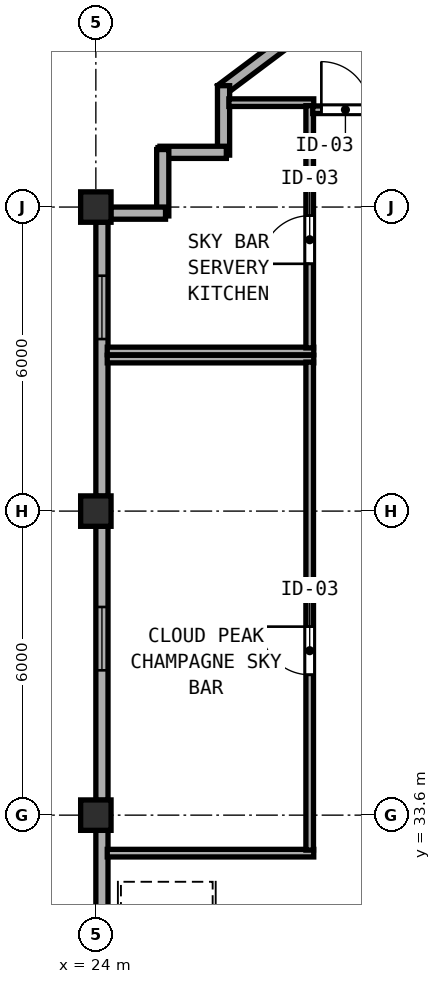
"""IFC4 building model, lengths in metres.
Left out: names, types, materials, properties, quantities, classifications, styles, units other than length and angle.
Written with IfcOpenShell. Run it as: python <this file> out.ifc"""

import sys

from ifc_helpers import new_model, si_unit, direction, frame, frame_2d, origin, origin_2d, place, context, subcontext, project, spatial, rectangle, hollow_rectangle, extrude, element, fill, save


model = new_model("IFC4")
c1 = context("Model", 3, precision=1e-05, world=origin(), true_north=direction((0.0, 1.0)))
c2 = subcontext(c1, "Body", "Model", "MODEL_VIEW")
j1 = project(units=[si_unit("LENGTHUNIT", "METRE"), si_unit("PLANEANGLEUNIT", "RADIAN")], contexts=[c1])
p1 = place(None, origin())
s1 = spatial("IfcSite", under=j1, at=p1, CompositionType="ELEMENT")
p2 = place(p1, origin())
s2 = spatial("IfcBuilding", under=s1, at=p2, CompositionType="ELEMENT")
p3 = place(p2, frame((0.0, 0.0, 323.2)))
s3 = spatial("IfcBuildingStorey", under=s2, at=p3, CompositionType="ELEMENT", Elevation=323.2)
for number, where, z_axis, x_axis in (
    (1, (24.0, 33.6, 0.0), (0.0, 0.0, 1.0), (1.0, 0.0, 0.0)),
    (2, (24.0, 45.6, 0.0), (0.0, 0.0, 1.0), (1.0, 0.0, 0.0)),
    (3, (24.0, 39.6, 0.0), (0.0, 0.0, 1.0), (1.0, 0.0, 0.0)),
):
    element("IfcColumn", number, at=place(p3, frame(where, z_axis=z_axis, x_axis=x_axis)), inside=s3, PredefinedType="COLUMN", context=c2, shape_type="SweptSolid", body=[
        extrude(hollow_rectangle(XDim=0.6, YDim=0.6, WallThickness=0.024, at=origin_2d()), origin(), (0.0, 0.0, 1.0), 5.0),
    ])
p4 = place(p3, frame((31.292, 51.519, 0.0), z_axis=(0.0, 0.0, 1.0), x_axis=(-0.8, -0.6, 0.0)))
e4 = element("IfcWall", 4, at=p4, inside=s3, PredefinedType="SOLIDWALL", context=c2, shape_type="SweptSolid", body=[
    extrude(rectangle(XDim=6.021, YDim=0.24, at=frame_2d((3.01, 0.0))), origin(), (0.0, 0.0, 1.0), 4.75),
])
p5 = place(p4, frame((1.6, 0.0, 0.85)))
e5 = element("IfcOpeningElement", 5, at=p5, cuts=e4, PredefinedType="OPENING", context=c2, shape_type="SweptSolid", body=[
    extrude(rectangle(XDim=1.25, YDim=1.95, at=frame_2d((0.625, 0.975))), frame((0.0, 0.13, 0.0), z_axis=(0.0, -1.0, 0.0), x_axis=(1.0, 0.0, 0.0)), (0.0, 0.0, 1.0), 0.26),
])
p6 = place(p3, frame((26.52, 47.995, 0.0), z_axis=(0.0, 0.0, 1.0), x_axis=(0.0, -1.0, 0.0)))
e6 = element("IfcWall", 6, at=p6, inside=s3, PredefinedType="SOLIDWALL", context=c2, shape_type="SweptSolid", body=[
    extrude(rectangle(XDim=1.37, YDim=0.24, at=frame_2d((0.685, 0.0))), origin(), (0.0, 0.0, 1.0), 4.75),
])
for number, where, z_axis, x_axis in (
    (7, (26.575, 46.68, 0.0), (0.0, 0.0, 1.0), (-1.0, 0.0, 0.0)),
    (8, (25.32, 46.735, 0.0), (0.0, 0.0, 1.0), (0.0, -1.0, 0.0)),
):
    element("IfcWall", number, at=place(p3, frame(where, z_axis=z_axis, x_axis=x_axis)), inside=s3, PredefinedType="SOLIDWALL", context=c2, shape_type="SweptSolid", body=[
        extrude(rectangle(XDim=1.31, YDim=0.24, at=frame_2d((0.655, 0.0))), origin(), (0.0, 0.0, 1.0), 4.75),
    ])
p7 = place(p3, frame((25.375, 45.48, 0.0), z_axis=(0.0, 0.0, 1.0), x_axis=(-1.0, 0.0, 0.0)))
e9 = element("IfcWall", 9, at=p7, inside=s3, PredefinedType="SOLIDWALL", context=c2, shape_type="SweptSolid", body=[
    extrude(rectangle(XDim=1.083, YDim=0.24, at=frame_2d((0.542, 0.0))), origin(), (0.0, 0.0, 1.0), 4.75),
])
p8 = place(p3, frame((24.12, 45.308, 0.0), z_axis=(0.0, 0.0, 1.0), x_axis=(0.0, -1.0, 0.0)))
e10 = element("IfcWall", 10, at=p8, inside=s3, PredefinedType="SOLIDWALL", context=c2, shape_type="SweptSolid", body=[
    extrude(rectangle(XDim=5.416, YDim=0.24, at=frame_2d((2.708, 0.0))), origin(), (0.0, 0.0, 1.0), 4.75),
])
p9 = place(p8, frame((1.063, 0.0, 0.85)))
e11 = element("IfcOpeningElement", 11, at=p9, cuts=e10, PredefinedType="OPENING", context=c2, shape_type="SweptSolid", body=[
    extrude(rectangle(XDim=1.25, YDim=1.95, at=frame_2d((0.625, 0.975))), frame((0.0, 0.13, 0.0), z_axis=(0.0, -1.0, 0.0), x_axis=(1.0, 0.0, 0.0)), (0.0, 0.0, 1.0), 0.26),
])
p10 = place(p3, frame((24.12, 39.308, 0.0), z_axis=(0.0, 0.0, 1.0), x_axis=(0.0, -1.0, 0.0)))
e12 = element("IfcWall", 12, at=p10, inside=s3, PredefinedType="SOLIDWALL", context=c2, shape_type="SweptSolid", body=[
    extrude(rectangle(XDim=5.416, YDim=0.24, at=frame_2d((2.708, 0.0))), origin(), (0.0, 0.0, 1.0), 4.75),
])
p11 = place(p10, frame((1.6, 0.0, 0.85)))
e13 = element("IfcOpeningElement", 13, at=p11, cuts=e12, PredefinedType="OPENING", context=c2, shape_type="SweptSolid", body=[
    extrude(rectangle(XDim=1.25, YDim=1.95, at=frame_2d((0.625, 0.975))), frame((0.0, 0.13, 0.0), z_axis=(0.0, -1.0, 0.0), x_axis=(1.0, 0.0, 0.0)), (0.0, 0.0, 1.0), 0.26),
])
p12 = place(p3, frame((24.12, 33.308, 0.0), z_axis=(0.0, 0.0, 1.0), x_axis=(0.0, -1.0, 0.0)))
e14 = element("IfcWall", 14, at=p12, inside=s3, PredefinedType="SOLIDWALL", context=c2, shape_type="SweptSolid", body=[
    extrude(rectangle(XDim=5.416, YDim=0.24, at=frame_2d((2.708, 0.0))), origin(), (0.0, 0.0, 1.0), 4.75),
])
p13 = place(p12, frame((1.6, 0.0, 0.85)))
e15 = element("IfcOpeningElement", 15, at=p13, cuts=e14, PredefinedType="OPENING", context=c2, shape_type="SweptSolid", body=[
    extrude(rectangle(XDim=1.25, YDim=1.95, at=frame_2d((0.625, 0.975))), frame((0.0, 0.13, 0.0), z_axis=(0.0, -1.0, 0.0), x_axis=(1.0, 0.0, 0.0)), (0.0, 0.0, 1.0), 0.26),
])
for number, where, z_axis, x_axis in (
    (16, (24.225, 42.6, 0.0), (0.0, 0.0, 1.0), (1.0, 0.0, 0.0)),
    (17, (24.225, 32.85, 0.0), (0.0, 0.0, 1.0), (1.0, 0.0, 0.0)),
):
    element("IfcWall", number, at=place(p3, frame(where, z_axis=z_axis, x_axis=x_axis)), inside=s3, PredefinedType="PARTITIONING", context=c2, shape_type="SweptSolid", body=[
        extrude(rectangle(XDim=4.075, YDim=0.15, at=frame_2d((2.038, 0.0))), origin(), (0.0, 0.0, 1.0), 4.75),
    ])
p14 = place(p3, frame((28.22, 32.91, 0.0), z_axis=(0.0, 0.0, 1.0), x_axis=(0.0, 1.0, 0.0)))
e18 = element("IfcWall", 18, at=p14, inside=s3, PredefinedType="PARTITIONING", context=c2, shape_type="SweptSolid", body=[
    extrude(rectangle(XDim=9.63, YDim=0.15, at=frame_2d((4.815, 0.0))), origin(), (0.0, 0.0, 1.0), 4.75),
])
p15 = place(p14, frame((4.41, 0.0, 0.0), z_axis=(0.0, 0.0, 1.0), x_axis=(-1.0, 0.0, 0.0)))
e19 = element("IfcOpeningElement", 19, at=p15, cuts=e18, PredefinedType="OPENING", context=c2, shape_type="SweptSolid", body=[
    extrude(rectangle(XDim=0.95, YDim=2.12, at=frame_2d((0.475, 1.06))), frame((0.0, 0.085, 0.0), z_axis=(0.0, -1.0, 0.0), x_axis=(1.0, 0.0, 0.0)), (0.0, 0.0, 1.0), 0.17),
])
p16 = place(p3, frame((26.625, 47.66, 0.0), z_axis=(0.0, 0.0, 1.0), x_axis=(1.0, 0.0, 0.0)))
e20 = element("IfcWall", 20, at=p16, inside=s3, PredefinedType="PARTITIONING", context=c2, shape_type="SweptSolid", body=[
    extrude(rectangle(XDim=1.675, YDim=0.15, at=frame_2d((0.837, 0.0))), origin(), (0.0, 0.0, 1.0), 4.75),
])
p17 = place(p3, frame((24.225, 42.76, 0.0), z_axis=(0.0, 0.0, 1.0), x_axis=(1.0, 0.0, 0.0)))
e21 = element("IfcWall", 21, at=p17, inside=s3, PredefinedType="PARTITIONING", context=c2, shape_type="SweptSolid", body=[
    extrude(rectangle(XDim=4.075, YDim=0.15, at=frame_2d((2.038, 0.0))), origin(), (0.0, 0.0, 1.0), 4.75),
])
p18 = place(p3, frame((28.22, 42.82, 0.0), z_axis=(0.0, 0.0, 1.0), x_axis=(0.0, 1.0, 0.0)))
e22 = element("IfcWall", 22, at=p18, inside=s3, PredefinedType="PARTITIONING", context=c2, shape_type="SweptSolid", body=[
    extrude(rectangle(XDim=4.78, YDim=0.15, at=frame_2d((2.39, 0.0))), origin(), (0.0, 0.0, 1.0), 4.75),
])
p19 = place(p18, frame((2.61, 0.0, 0.0), z_axis=(0.0, 0.0, 1.0), x_axis=(-1.0, 0.0, 0.0)))
e23 = element("IfcOpeningElement", 23, at=p19, cuts=e22, PredefinedType="OPENING", context=c2, shape_type="SweptSolid", body=[
    extrude(rectangle(XDim=0.95, YDim=2.12, at=frame_2d((0.475, 1.06))), frame((0.0, 0.085, 0.0), z_axis=(0.0, -1.0, 0.0), x_axis=(1.0, 0.0, 0.0)), (0.0, 0.0, 1.0), 0.17),
])
p20 = place(p3, frame((28.28, 47.52, 0.0), z_axis=(0.0, 0.0, 1.0), x_axis=(1.0, 0.0, 0.0)))
e24 = element("IfcWall", 24, at=p20, inside=s3, PredefinedType="PARTITIONING", context=c2, shape_type="SweptSolid", body=[
    extrude(rectangle(XDim=5.688, YDim=0.15, at=frame_2d((2.844, 0.0))), origin(), (0.0, 0.0, 1.0), 4.75),
])
p21 = place(p20, frame((0.17, 0.0, 0.0)))
e25 = element("IfcOpeningElement", 25, at=p21, cuts=e24, PredefinedType="OPENING", context=c2, shape_type="SweptSolid", body=[
    extrude(rectangle(XDim=0.95, YDim=2.12, at=frame_2d((0.475, 1.06))), frame((0.0, 0.085, 0.0), z_axis=(0.0, -1.0, 0.0), x_axis=(1.0, 0.0, 0.0)), (0.0, 0.0, 1.0), 0.17),
])
p22 = place(p9, origin())
e26 = element("IfcWindow", 26, at=p22, inside=s3, PartitioningType="SINGLE_PANEL", PredefinedType="WINDOW", context=c2, shape_type="SweptSolid", body=[
    extrude(rectangle(XDim=1.25, YDim=1.95, at=frame_2d((0.625, 0.975))), frame((0.0, 0.03, 0.0), z_axis=(0.0, -1.0, 0.0), x_axis=(1.0, 0.0, 0.0)), (0.0, 0.0, 1.0), 0.06),
])
fill(e11, e26)
p23 = place(p11, origin())
e27 = element("IfcWindow", 27, at=p23, inside=s3, PartitioningType="SINGLE_PANEL", PredefinedType="WINDOW", context=c2, shape_type="SweptSolid", body=[
    extrude(rectangle(XDim=1.25, YDim=1.95, at=frame_2d((0.625, 0.975))), frame((0.0, 0.03, 0.0), z_axis=(0.0, -1.0, 0.0), x_axis=(1.0, 0.0, 0.0)), (0.0, 0.0, 1.0), 0.06),
])
fill(e13, e27)
p24 = place(p15, origin())
e28 = element("IfcDoor", 28, at=p24, inside=s3, OperationType="SINGLE_SWING_LEFT", PredefinedType="DOOR", context=c2, shape_type="SweptSolid", body=[
    extrude(rectangle(XDim=0.95, YDim=2.12, at=frame_2d((0.475, 1.06))), frame((0.0, 0.025, 0.0), z_axis=(0.0, -1.0, 0.0), x_axis=(1.0, 0.0, 0.0)), (0.0, 0.0, 1.0), 0.05),
])
fill(e19, e28)
p25 = place(p19, origin())
e29 = element("IfcDoor", 29, at=p25, inside=s3, OperationType="SINGLE_SWING_RIGHT", PredefinedType="DOOR", context=c2, shape_type="SweptSolid", body=[
    extrude(rectangle(XDim=0.95, YDim=2.12, at=frame_2d((0.475, 1.06))), frame((0.0, 0.025, 0.0), z_axis=(0.0, -1.0, 0.0), x_axis=(1.0, 0.0, 0.0)), (0.0, 0.0, 1.0), 0.05),
])
fill(e23, e29)
p26 = place(p21, origin())
e30 = element("IfcDoor", 30, at=p26, inside=s3, OperationType="SINGLE_SWING_LEFT", PredefinedType="DOOR", context=c2, shape_type="SweptSolid", body=[
    extrude(rectangle(XDim=0.95, YDim=2.12, at=frame_2d((0.475, 1.06))), frame((0.0, 0.025, 0.0), z_axis=(0.0, -1.0, 0.0), x_axis=(1.0, 0.0, 0.0)), (0.0, 0.0, 1.0), 0.05),
])
fill(e25, e30)
save(model, sys.argv[1])
